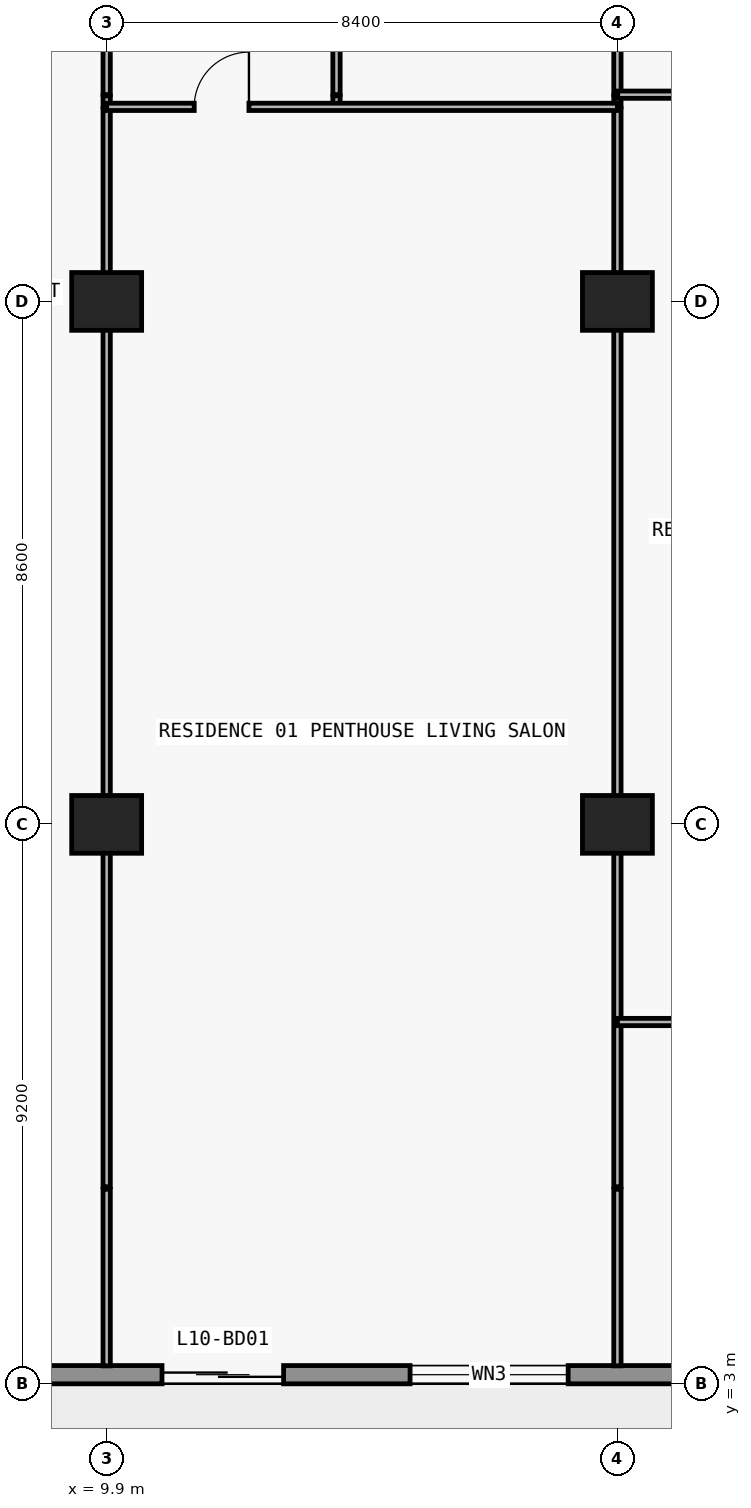
"""IFC4 building model, lengths in metres.
Left out: names, types, materials, properties, quantities, classifications, styles, units other than length and angle.
Written with IfcOpenShell. Run it as: python <this file> out.ifc"""

import sys

from ifc_helpers import new_model, si_unit, direction, frame, frame_2d, origin, origin_2d, place, context, subcontext, project, spatial, rectangle, extrude, element, fill, save


model = new_model("IFC4")
c1 = context("Model", 3, precision=1e-05, world=origin(), true_north=direction((0.0, 1.0)))
c2 = subcontext(c1, "Body", "Model", "MODEL_VIEW")
j1 = project(units=[si_unit("LENGTHUNIT", "METRE"), si_unit("PLANEANGLEUNIT", "RADIAN")], contexts=[c1])
p1 = place(None, origin())
s1 = spatial("IfcSite", under=j1, at=p1, CompositionType="ELEMENT")
p2 = place(p1, origin())
s2 = spatial("IfcBuilding", under=s1, at=p2, CompositionType="ELEMENT")
p3 = place(p2, frame((0.0, 0.0, 43.2)))
s3 = spatial("IfcBuildingStorey", under=s2, at=p3, CompositionType="ELEMENT", Elevation=43.2)
for number, where, z_axis, x_axis in (
    (1, (9.9, 12.2, 0.0), (0.0, 0.0, 1.0), (1.0, 0.0, 0.0)),
    (2, (18.3, 12.2, 0.0), (0.0, 0.0, 1.0), (1.0, 0.0, 0.0)),
    (3, (9.9, 20.8, 0.0), (0.0, 0.0, 1.0), (1.0, 0.0, 0.0)),
    (4, (18.3, 20.8, 0.0), (0.0, 0.0, 1.0), (1.0, 0.0, 0.0)),
):
    element("IfcColumn", number, at=place(p3, frame(where, z_axis=z_axis, x_axis=x_axis)), inside=s3, PredefinedType="COLUMN", context=c2, shape_type="SweptSolid", body=[
        extrude(rectangle(XDim=1.15, YDim=0.95, at=origin_2d()), origin(), (0.0, 0.0, 1.0), 3.05),
    ])
p4 = place(p3, frame((72.7, 3.15, 0.0), z_axis=(0.0, 0.0, 1.0), x_axis=(-1.0, 0.0, 0.0)))
e5 = element("IfcWall", 5, at=p4, inside=s3, PredefinedType="STANDARD", context=c2, shape_type="SweptSolid", body=[
    extrude(rectangle(XDim=67.6, YDim=0.3, at=frame_2d((33.8, 0.0))), origin(), (0.0, 0.0, 1.0), 3.05),
])
p5 = place(p4, frame((59.89, 0.0, 0.0)))
e6 = element("IfcOpeningElement", 6, at=p5, cuts=e5, PredefinedType="OPENING", context=c2, shape_type="SweptSolid", body=[
    extrude(rectangle(XDim=2.0, YDim=2.3, at=frame_2d((1.0, 1.15))), frame((0.0, 0.16, 0.0), z_axis=(0.0, -1.0, 0.0), x_axis=(1.0, 0.0, 0.0)), (0.0, 0.0, 1.0), 0.32),
])
p6 = place(p4, frame((55.21, 0.0, 0.65)))
e7 = element("IfcOpeningElement", 7, at=p6, cuts=e5, PredefinedType="OPENING", context=c2, shape_type="SweptSolid", body=[
    extrude(rectangle(XDim=2.6, YDim=1.85, at=frame_2d((1.3, 0.925))), frame((0.0, 0.16, 0.0), z_axis=(0.0, -1.0, 0.0), x_axis=(1.0, 0.0, 0.0)), (0.0, 0.0, 1.0), 0.32),
])
p7 = place(p4, frame((49.1, 0.0, 0.85)))
e8 = element("IfcOpeningElement", 8, at=p7, cuts=e5, PredefinedType="OPENING", context=c2, shape_type="SweptSolid", body=[
    extrude(rectangle(XDim=2.2, YDim=1.55, at=frame_2d((1.1, 0.775))), frame((0.0, 0.16, 0.0), z_axis=(0.0, -1.0, 0.0), x_axis=(1.0, 0.0, 0.0)), (0.0, 0.0, 1.0), 0.32),
])
p8 = place(p4, frame((42.69, 0.0, 0.0)))
e9 = element("IfcOpeningElement", 9, at=p8, cuts=e5, PredefinedType="OPENING", context=c2, shape_type="SweptSolid", body=[
    extrude(rectangle(XDim=2.0, YDim=2.3, at=frame_2d((1.0, 1.15))), frame((0.0, 0.16, 0.0), z_axis=(0.0, -1.0, 0.0), x_axis=(1.0, 0.0, 0.0)), (0.0, 0.0, 1.0), 0.32),
])
p9 = place(p4, frame((38.59, 0.0, 0.85)))
e10 = element("IfcOpeningElement", 10, at=p9, cuts=e5, PredefinedType="OPENING", context=c2, shape_type="SweptSolid", body=[
    extrude(rectangle(XDim=1.8, YDim=1.55, at=frame_2d((0.9, 0.775))), frame((0.0, 0.16, 0.0), z_axis=(0.0, -1.0, 0.0), x_axis=(1.0, 0.0, 0.0)), (0.0, 0.0, 1.0), 0.32),
])
p10 = place(p4, frame((30.914, 0.0, 0.85)))
e11 = element("IfcOpeningElement", 11, at=p10, cuts=e5, PredefinedType="OPENING", context=c2, shape_type="SweptSolid", body=[
    extrude(rectangle(XDim=2.2, YDim=1.55, at=frame_2d((1.1, 0.775))), frame((0.0, 0.16, 0.0), z_axis=(0.0, -1.0, 0.0), x_axis=(1.0, 0.0, 0.0)), (0.0, 0.0, 1.0), 0.32),
])
p11 = place(p4, frame((26.69, 0.0, 0.0)))
e12 = element("IfcOpeningElement", 12, at=p11, cuts=e5, PredefinedType="OPENING", context=c2, shape_type="SweptSolid", body=[
    extrude(rectangle(XDim=2.0, YDim=2.3, at=frame_2d((1.0, 1.15))), frame((0.0, 0.16, 0.0), z_axis=(0.0, -1.0, 0.0), x_axis=(1.0, 0.0, 0.0)), (0.0, 0.0, 1.0), 0.32),
])
p12 = place(p4, frame((22.59, 0.0, 0.85)))
e13 = element("IfcOpeningElement", 13, at=p12, cuts=e5, PredefinedType="OPENING", context=c2, shape_type="SweptSolid", body=[
    extrude(rectangle(XDim=1.8, YDim=1.55, at=frame_2d((0.9, 0.775))), frame((0.0, 0.16, 0.0), z_axis=(0.0, -1.0, 0.0), x_axis=(1.0, 0.0, 0.0)), (0.0, 0.0, 1.0), 0.32),
])
p13 = place(p4, frame((18.69, 0.0, 0.0)))
e14 = element("IfcOpeningElement", 14, at=p13, cuts=e5, PredefinedType="OPENING", context=c2, shape_type="SweptSolid", body=[
    extrude(rectangle(XDim=2.0, YDim=2.3, at=frame_2d((1.0, 1.15))), frame((0.0, 0.16, 0.0), z_axis=(0.0, -1.0, 0.0), x_axis=(1.0, 0.0, 0.0)), (0.0, 0.0, 1.0), 0.32),
])
p14 = place(p4, frame((14.01, 0.0, 0.65)))
e15 = element("IfcOpeningElement", 15, at=p14, cuts=e5, PredefinedType="OPENING", context=c2, shape_type="SweptSolid", body=[
    extrude(rectangle(XDim=2.6, YDim=1.85, at=frame_2d((1.3, 0.925))), frame((0.0, 0.16, 0.0), z_axis=(0.0, -1.0, 0.0), x_axis=(1.0, 0.0, 0.0)), (0.0, 0.0, 1.0), 0.32),
])
p15 = place(p4, frame((7.9, 0.0, 0.85)))
e16 = element("IfcOpeningElement", 16, at=p15, cuts=e5, PredefinedType="OPENING", context=c2, shape_type="SweptSolid", body=[
    extrude(rectangle(XDim=2.2, YDim=1.55, at=frame_2d((1.1, 0.775))), frame((0.0, 0.16, 0.0), z_axis=(0.0, -1.0, 0.0), x_axis=(1.0, 0.0, 0.0)), (0.0, 0.0, 1.0), 0.32),
])
p16 = place(p3, frame((9.9, 3.295, 0.0), z_axis=(0.0, 0.0, 1.0), x_axis=(0.0, 1.0, 0.0)))
e17 = element("IfcWall", 17, at=p16, inside=s3, PredefinedType="PARTITIONING", context=c2, shape_type="SweptSolid", body=[
    extrude(rectangle(XDim=2.905, YDim=0.12, at=frame_2d((1.453, 0.0))), origin(), (0.0, 0.0, 1.0), 3.05),
])
p17 = place(p3, frame((9.9, 6.24, 0.0), z_axis=(0.0, 0.0, 1.0), x_axis=(0.0, 1.0, 0.0)))
e18 = element("IfcWall", 18, at=p17, inside=s3, PredefinedType="PARTITIONING", context=c2, shape_type="SweptSolid", body=[
    extrude(rectangle(XDim=17.73, YDim=0.12, at=frame_2d((8.865, 0.0))), origin(), (0.0, 0.0, 1.0), 2.11),
])
p18 = place(p3, frame((9.9, 24.0, 0.0), z_axis=(0.0, 0.0, 1.0), x_axis=(0.0, 1.0, 0.0)))
e19 = element("IfcWall", 19, at=p18, inside=s3, PredefinedType="PARTITIONING", context=c2, shape_type="SweptSolid", body=[
    extrude(rectangle(XDim=0.18, YDim=0.12, at=frame_2d((0.09, 0.0))), origin(), (0.0, 0.0, 1.0), 2.11),
])
p19 = place(p3, frame((9.9, 24.2, 0.0), z_axis=(0.0, 0.0, 1.0), x_axis=(0.0, 1.0, 0.0)))
e20 = element("IfcWall", 20, at=p19, inside=s3, PredefinedType="PARTITIONING", context=c2, shape_type="SweptSolid", body=[
    extrude(rectangle(XDim=4.38, YDim=0.12, at=frame_2d((2.19, 0.0))), origin(), (0.0, 0.0, 1.0), 2.11),
])
p20 = place(p19, frame((1.74, 0.0, 0.0)))
e21 = element("IfcOpeningElement", 21, at=p20, cuts=e20, PredefinedType="OPENING", context=c2, shape_type="SweptSolid", body=[
    extrude(rectangle(XDim=0.9, YDim=2.06, at=frame_2d((0.45, 1.03))), frame((0.0, 0.07, 0.0), z_axis=(0.0, -1.0, 0.0), x_axis=(1.0, 0.0, 0.0)), (0.0, 0.0, 1.0), 0.14),
])
p21 = place(p3, frame((13.68, 24.0, 0.0), z_axis=(0.0, 0.0, 1.0), x_axis=(0.0, 1.0, 0.0)))
e22 = element("IfcWall", 22, at=p21, inside=s3, PredefinedType="PARTITIONING", context=c2, shape_type="SweptSolid", body=[
    extrude(rectangle(XDim=0.18, YDim=0.12, at=frame_2d((0.09, 0.0))), origin(), (0.0, 0.0, 1.0), 3.05),
])
p22 = place(p3, frame((13.68, 24.2, 0.0), z_axis=(0.0, 0.0, 1.0), x_axis=(0.0, 1.0, 0.0)))
e23 = element("IfcWall", 23, at=p22, inside=s3, PredefinedType="PARTITIONING", context=c2, shape_type="SweptSolid", body=[
    extrude(rectangle(XDim=4.38, YDim=0.12, at=frame_2d((2.19, 0.0))), origin(), (0.0, 0.0, 1.0), 3.05),
])
p23 = place(p22, frame((1.74, 0.0, 0.0)))
e24 = element("IfcOpeningElement", 24, at=p23, cuts=e23, PredefinedType="OPENING", context=c2, shape_type="SweptSolid", body=[
    extrude(rectangle(XDim=0.9, YDim=2.15, at=frame_2d((0.45, 1.075))), frame((0.0, 0.07, 0.0), z_axis=(0.0, -1.0, 0.0), x_axis=(1.0, 0.0, 0.0)), (0.0, 0.0, 1.0), 0.14),
])
p24 = place(p3, frame((18.3, 3.295, 0.0), z_axis=(0.0, 0.0, 1.0), x_axis=(0.0, 1.0, 0.0)))
e25 = element("IfcWall", 25, at=p24, inside=s3, PredefinedType="PARTITIONING", context=c2, shape_type="SweptSolid", body=[
    extrude(rectangle(XDim=2.905, YDim=0.12, at=frame_2d((1.453, 0.0))), origin(), (0.0, 0.0, 1.0), 3.05),
])
p25 = place(p3, frame((18.3, 6.24, 0.0), z_axis=(0.0, 0.0, 1.0), x_axis=(0.0, 1.0, 0.0)))
e26 = element("IfcWall", 26, at=p25, inside=s3, PredefinedType="PARTITIONING", context=c2, shape_type="SweptSolid", body=[
    extrude(rectangle(XDim=17.73, YDim=0.12, at=frame_2d((8.865, 0.0))), origin(), (0.0, 0.0, 1.0), 2.11),
])
p26 = place(p3, frame((18.3, 24.0, 0.0), z_axis=(0.0, 0.0, 1.0), x_axis=(0.0, 1.0, 0.0)))
e27 = element("IfcWall", 27, at=p26, inside=s3, PredefinedType="PARTITIONING", context=c2, shape_type="SweptSolid", body=[
    extrude(rectangle(XDim=0.18, YDim=0.12, at=frame_2d((0.09, 0.0))), origin(), (0.0, 0.0, 1.0), 2.11),
])
p27 = place(p3, frame((18.3, 24.2, 0.0), z_axis=(0.0, 0.0, 1.0), x_axis=(0.0, 1.0, 0.0)))
e28 = element("IfcWall", 28, at=p27, inside=s3, PredefinedType="PARTITIONING", context=c2, shape_type="SweptSolid", body=[
    extrude(rectangle(XDim=4.38, YDim=0.12, at=frame_2d((2.19, 0.0))), origin(), (0.0, 0.0, 1.0), 2.11),
])
p28 = place(p27, frame((1.74, 0.0, 0.0)))
e29 = element("IfcOpeningElement", 29, at=p28, cuts=e28, PredefinedType="OPENING", context=c2, shape_type="SweptSolid", body=[
    extrude(rectangle(XDim=0.9, YDim=2.06, at=frame_2d((0.45, 1.03))), frame((0.0, 0.07, 0.0), z_axis=(0.0, -1.0, 0.0), x_axis=(1.0, 0.0, 0.0)), (0.0, 0.0, 1.0), 0.14),
])
p29 = place(p3, frame((18.3, 8.95, 0.0), z_axis=(0.0, 0.0, 1.0), x_axis=(1.0, 0.0, 0.0)))
e30 = element("IfcWall", 30, at=p29, inside=s3, PredefinedType="PARTITIONING", context=c2, shape_type="SweptSolid", body=[
    extrude(rectangle(XDim=8.35, YDim=0.12, at=frame_2d((4.175, 0.0))), origin(), (0.0, 0.0, 1.0), 3.05),
])
p30 = place(p29, frame((3.725, 0.0, 0.0)))
e31 = element("IfcOpeningElement", 31, at=p30, cuts=e30, PredefinedType="OPENING", context=c2, shape_type="SweptSolid", body=[
    extrude(rectangle(XDim=0.9, YDim=2.15, at=frame_2d((0.45, 1.075))), frame((0.0, 0.07, 0.0), z_axis=(0.0, -1.0, 0.0), x_axis=(1.0, 0.0, 0.0)), (0.0, 0.0, 1.0), 0.14),
])
p31 = place(p3, frame((9.9, 24.0, 0.0), z_axis=(0.0, 0.0, 1.0), x_axis=(1.0, 0.0, 0.0)))
e32 = element("IfcWall", 32, at=p31, inside=s3, PredefinedType="PARTITIONING", context=c2, shape_type="SweptSolid", body=[
    extrude(rectangle(XDim=8.4, YDim=0.12, at=frame_2d((4.2, 0.0))), origin(), (0.0, 0.0, 1.0), 3.05),
])
p32 = place(p31, frame((1.44, 0.0, 0.0)))
e33 = element("IfcOpeningElement", 33, at=p32, cuts=e32, PredefinedType="OPENING", context=c2, shape_type="SweptSolid", body=[
    extrude(rectangle(XDim=0.9, YDim=2.15, at=frame_2d((0.45, 1.075))), frame((0.0, 0.07, 0.0), z_axis=(0.0, -1.0, 0.0), x_axis=(1.0, 0.0, 0.0)), (0.0, 0.0, 1.0), 0.14),
])
p33 = place(p3, frame((18.305, 24.2, 0.0), z_axis=(0.0, 0.0, 1.0), x_axis=(1.0, 0.0, 0.0)))
e34 = element("IfcWall", 34, at=p33, inside=s3, PredefinedType="PARTITIONING", context=c2, shape_type="SweptSolid", body=[
    extrude(rectangle(XDim=8.125, YDim=0.12, at=frame_2d((4.062, 0.0))), origin(), (0.0, 0.0, 1.0), 3.05),
])
p34 = place(p33, frame((3.613, 0.0, 0.0)))
e35 = element("IfcOpeningElement", 35, at=p34, cuts=e34, PredefinedType="OPENING", context=c2, shape_type="SweptSolid", body=[
    extrude(rectangle(XDim=0.9, YDim=2.15, at=frame_2d((0.45, 1.075))), frame((0.0, 0.07, 0.0), z_axis=(0.0, -1.0, 0.0), x_axis=(1.0, 0.0, 0.0)), (0.0, 0.0, 1.0), 0.14),
])
p35 = place(p5, origin())
e36 = element("IfcDoor", 36, at=p35, inside=s3, OperationType="DOUBLE_DOOR_SLIDING", PredefinedType="DOOR", context=c2, shape_type="SweptSolid", body=[
    extrude(rectangle(XDim=2.0, YDim=2.3, at=frame_2d((1.0, 1.15))), frame((0.0, 0.025, 0.0), z_axis=(0.0, -1.0, 0.0), x_axis=(1.0, 0.0, 0.0)), (0.0, 0.0, 1.0), 0.05),
])
fill(e6, e36)
p36 = place(p6, origin())
e37 = element("IfcWindow", 37, at=p36, inside=s3, PartitioningType="SINGLE_PANEL", PredefinedType="WINDOW", context=c2, shape_type="SweptSolid", body=[
    extrude(rectangle(XDim=2.6, YDim=1.85, at=frame_2d((1.3, 0.925))), frame((0.0, 0.03, 0.0), z_axis=(0.0, -1.0, 0.0), x_axis=(1.0, 0.0, 0.0)), (0.0, 0.0, 1.0), 0.06),
])
fill(e7, e37)
p37 = place(p32, origin())
e38 = element("IfcDoor", 38, at=p37, inside=s3, OperationType="SINGLE_SWING_RIGHT", PredefinedType="DOOR", context=c2, shape_type="SweptSolid", body=[
    extrude(rectangle(XDim=0.9, YDim=2.15, at=frame_2d((0.45, 1.075))), frame((0.0, 0.025, 0.0), z_axis=(0.0, -1.0, 0.0), x_axis=(1.0, 0.0, 0.0)), (0.0, 0.0, 1.0), 0.05),
])
fill(e33, e38)
save(model, sys.argv[1])
